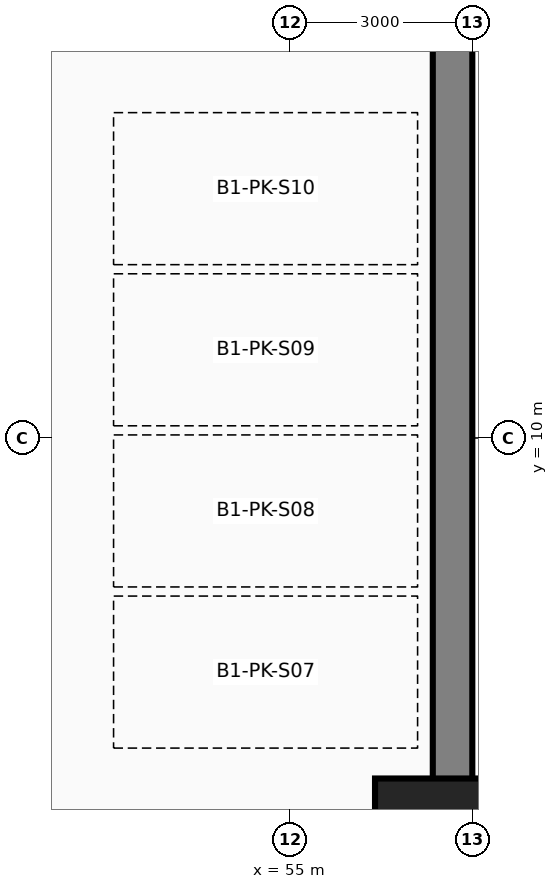
"""IFC4 building model, lengths in metres.
Left out: names, types, materials, properties, quantities, classifications, styles, units other than length and angle.
Written with IfcOpenShell. Run it as: python <this file> out.ifc"""

import sys

from ifc_helpers import new_model, si_unit, direction, frame, frame_2d, origin, origin_2d, place, context, subcontext, project, spatial, rectangle, extrude, element, save


model = new_model("IFC4")
c1 = context("Model", 3, precision=1e-05, world=origin(), true_north=direction((0.0, 1.0)))
c2 = subcontext(c1, "Body", "Model", "MODEL_VIEW")
j1 = project(units=[si_unit("LENGTHUNIT", "METRE"), si_unit("PLANEANGLEUNIT", "RADIAN")], contexts=[c1])
p1 = place(None, origin())
s1 = spatial("IfcSite", under=j1, at=p1, CompositionType="ELEMENT")
p2 = place(p1, origin())
s2 = spatial("IfcBuilding", under=s1, at=p2, CompositionType="ELEMENT")
p3 = place(p2, frame((0.0, 0.0, -4.5)))
s3 = spatial("IfcBuildingStorey", under=s2, at=p3, CompositionType="ELEMENT", Elevation=-4.5)
p4 = place(p3, frame((57.675, 46.0, 0.0), z_axis=(0.0, 0.0, 1.0), x_axis=(0.0, -1.0, 0.0)))
e1 = element("IfcWall", 1, at=p4, inside=s3, PredefinedType="SOLIDWALL", context=c2, shape_type="SweptSolid", body=[
    extrude(rectangle(XDim=46.0, YDim=0.65, at=frame_2d((23.0, 0.0))), origin(), (0.0, 0.0, 1.0), 4.5),
])
p5 = place(p3, frame((57.4, 3.6, 0.0), z_axis=(0.0, 0.0, 1.0), x_axis=(0.0, 1.0, 0.0)))
e2 = element("IfcColumn", 2, at=p5, inside=s3, PredefinedType="COLUMN", context=c2, shape_type="SweptSolid", body=[
    extrude(rectangle(XDim=1.6, YDim=2.0, at=origin_2d()), origin(), (0.0, 0.0, 1.0), 4.5),
])
save(model, sys.argv[1])
